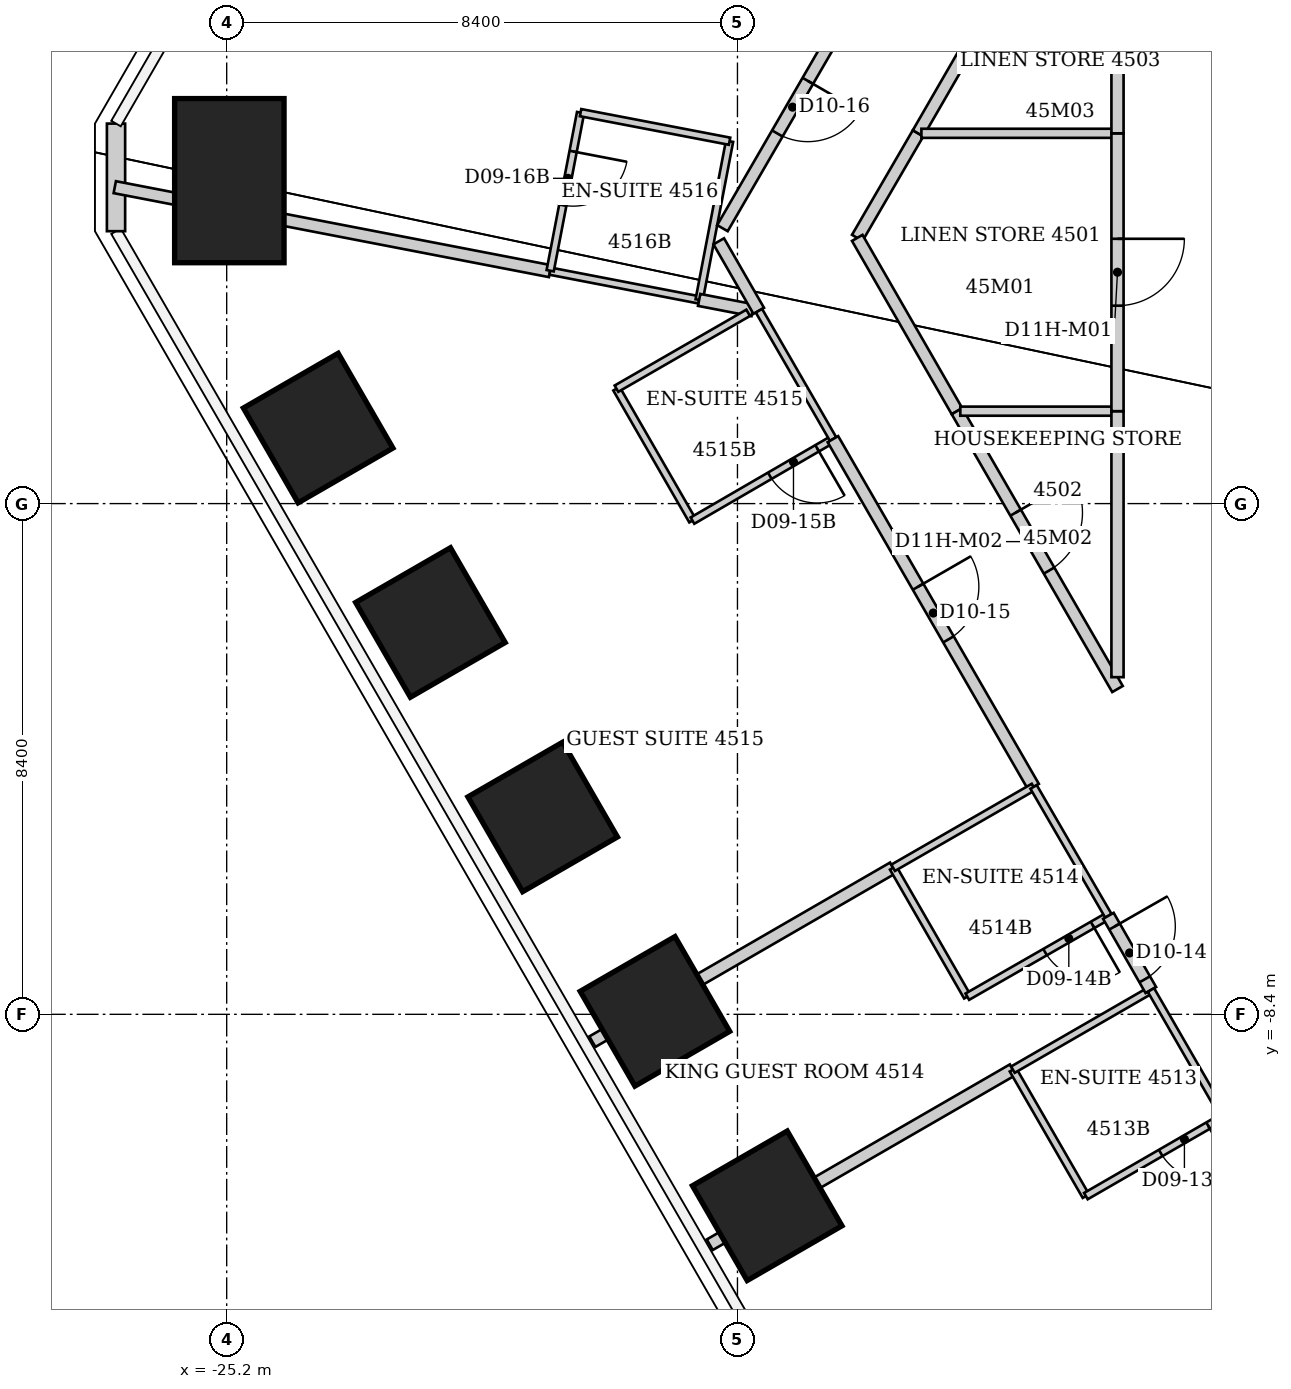
"""IFC4 building model, lengths in metres.
Left out: names, types, materials, properties, quantities, classifications, styles, units other than length and angle.
Written with IfcOpenShell. Run it as: python <this file> out.ifc"""

import sys

from ifc_helpers import new_model, si_unit, direction, frame, frame_2d, origin, origin_2d, place, context, subcontext, project, spatial, rectangle, extrude, element, fill, save


model = new_model("IFC4")
c1 = context("Model", 3, precision=1e-05, world=origin(), true_north=direction((0.0, 1.0)))
c2 = subcontext(c1, "Body", "Model", "MODEL_VIEW")
j1 = project(units=[si_unit("LENGTHUNIT", "METRE"), si_unit("PLANEANGLEUNIT", "RADIAN")], contexts=[c1])
p1 = place(None, origin())
s1 = spatial("IfcSite", under=j1, at=p1, CompositionType="ELEMENT")
p2 = place(p1, origin())
s2 = spatial("IfcBuilding", under=s1, at=p2, CompositionType="ELEMENT")
p3 = place(p2, frame((0.0, 0.0, 183.2)))
s3 = spatial("IfcBuildingStorey", under=s2, at=p3, CompositionType="ELEMENT", Elevation=183.2)
for number, where, z_axis, x_axis in (
    (1, (-16.311, -11.549, 0.0), (0.0, 0.0, 1.0), (-0.866, -0.5, 0.0)),
    (2, (-18.157, -8.351, 0.0), (0.0, 0.0, 1.0), (-0.866, -0.5, 0.0)),
    (3, (-20.003, -5.153, 0.0), (0.0, 0.0, 1.0), (-0.866, -0.5, 0.0)),
    (4, (-21.85, -1.956, 0.0), (0.0, 0.0, 1.0), (-0.866, -0.5, 0.0)),
    (5, (-23.696, 1.242, 0.0), (0.0, 0.0, 1.0), (-0.866, -0.5, 0.0)),
):
    element("IfcColumn", number, at=place(p3, frame(where, z_axis=z_axis, x_axis=x_axis)), inside=s3, PredefinedType="COLUMN", context=c2, shape_type="SweptSolid", body=[
        extrude(rectangle(XDim=1.8, YDim=1.8, at=origin_2d()), origin(), (0.0, 0.0, 1.0), 3.8),
    ])
p4 = place(p3, frame((-25.156, 5.311, 0.0), z_axis=(0.0, 0.0, 1.0), x_axis=(-1.0, 0.0, 0.0)))
e6 = element("IfcColumn", 6, at=p4, inside=s3, PredefinedType="COLUMN", context=c2, shape_type="SweptSolid", body=[
    extrude(rectangle(XDim=1.8, YDim=2.7, at=origin_2d()), origin(), (0.0, 0.0, 1.0), 3.8),
])
p5 = place(p3, frame((-27.02, 4.48, 0.0), z_axis=(0.0, 0.0, 1.0), x_axis=(0.0, 1.0, 0.0)))
e7 = element("IfcWall", 7, at=p5, inside=s3, PredefinedType="SOLIDWALL", context=c2, shape_type="SweptSolid", body=[
    extrude(rectangle(XDim=1.77, YDim=0.3, at=frame_2d((0.885, 0.0))), origin(), (0.0, 0.0, 1.0), 3.64),
])
p6 = place(p3, frame((-27.041, 5.204, 0.0), z_axis=(0.0, 0.0, 1.0), x_axis=(0.981883480928, -0.189485698355, 0.0)))
e8 = element("IfcWall", 8, at=p6, inside=s3, PredefinedType="PARTITIONING", context=c2, shape_type="SweptSolid", body=[
    extrude(rectangle(XDim=7.291, YDim=0.2, at=frame_2d((3.646, 0.0))), origin(), (0.0, 0.0, 1.0), 3.64),
])
p7 = place(p3, frame((-19.881, 3.823, 0.0), z_axis=(0.0, 0.0, 1.0), x_axis=(0.981896775229, -0.189416796496, 0.0)))
e9 = element("IfcWall", 9, at=p7, inside=s3, PredefinedType="PARTITIONING", context=c2, shape_type="SweptSolid", body=[
    extrude(rectangle(XDim=2.497, YDim=0.12, at=frame_2d((1.248, 0.0))), origin(), (0.0, 0.0, 1.0), 3.64),
])
p8 = place(p3, frame((-19.38, 6.43, 0.0), z_axis=(0.0, 0.0, 1.0), x_axis=(-0.18885765444, -0.982004473696, 0.0)))
e10 = element("IfcWall", 10, at=p8, inside=s3, PredefinedType="PARTITIONING", context=c2, shape_type="SweptSolid", body=[
    extrude(rectangle(XDim=2.647, YDim=0.12, at=frame_2d((1.324, 0.0))), origin(), (0.0, 0.0, 1.0), 3.64),
])
p9 = place(p8, frame((0.65, 0.0, 0.0)))
e11 = element("IfcOpeningElement", 11, at=p9, cuts=e10, PredefinedType="OPENING", context=c2, shape_type="SweptSolid", body=[
    extrude(rectangle(XDim=0.9, YDim=2.03, at=frame_2d((0.45, 1.015))), frame((0.0, 0.06, 0.0), z_axis=(0.0, -1.0, 0.0), x_axis=(1.0, 0.0, 0.0)), (0.0, 0.0, 1.0), 0.12),
])
p10 = place(p3, frame((-19.186, -8.85, 0.0), z_axis=(0.0, 0.0, 1.0), x_axis=(0.865702137343, 0.500559496364, 0.0)))
e12 = element("IfcWall", 12, at=p10, inside=s3, PredefinedType="PARTITIONING", context=c2, shape_type="SweptSolid", body=[
    extrude(rectangle(XDim=5.713, YDim=0.2, at=frame_2d((2.857, 0.0))), origin(), (0.0, 0.0, 1.0), 3.038),
])
p11 = place(p3, frame((-18.79, 1.89, 0.0), z_axis=(0.0, 0.0, 1.0), x_axis=(0.499159685399, -0.866510016372, 0.0)))
e13 = element("IfcWall", 13, at=p11, inside=s3, PredefinedType="PARTITIONING", context=c2, shape_type="SweptSolid", body=[
    extrude(rectangle(XDim=2.504, YDim=0.12, at=frame_2d((1.252, 0.0))), origin(), (0.0, 0.0, 1.0), 3.64),
])
p12 = place(p3, frame((-17.54, -0.28, 0.0), z_axis=(0.0, 0.0, 1.0), x_axis=(0.86498992408, 0.501789229896, 0.0)))
e14 = element("IfcWall", 14, at=p12, inside=s3, PredefinedType="PARTITIONING", context=c2, shape_type="SweptSolid", body=[
    extrude(rectangle(XDim=2.671, YDim=0.12, at=frame_2d((1.335, 0.0))), origin(), (0.0, 0.0, 1.0), 3.64),
])
p13 = place(p12, frame((1.47, 0.0, 0.0)))
e15 = element("IfcOpeningElement", 15, at=p13, cuts=e14, PredefinedType="OPENING", context=c2, shape_type="SweptSolid", body=[
    extrude(rectangle(XDim=0.9, YDim=2.03, at=frame_2d((0.45, 1.015))), frame((0.0, 0.06, 0.0), z_axis=(0.0, -1.0, 0.0), x_axis=(1.0, 0.0, 0.0)), (0.0, 0.0, 1.0), 0.12),
])
p14 = place(p3, frame((-17.43, 3.35, 0.0), z_axis=(0.0, 0.0, 1.0), x_axis=(0.188159009227, 0.982138578433, 0.0)))
e16 = element("IfcWall", 16, at=p14, inside=s3, PredefinedType="PARTITIONING", context=c2, shape_type="SweptSolid", body=[
    extrude(rectangle(XDim=2.657, YDim=0.12, at=frame_2d((1.329, 0.0))), origin(), (0.0, 0.0, 1.0), 3.64),
])
p15 = place(p3, frame((-17.43, 3.35, 0.0), z_axis=(0.0, 0.0, 1.0), x_axis=(0.981858463983, -0.189615286052, 0.0)))
e17 = element("IfcWall", 17, at=p15, inside=s3, PredefinedType="PARTITIONING", context=c2, shape_type="SweptSolid", body=[
    extrude(rectangle(XDim=0.896, YDim=0.2, at=frame_2d((0.448, 0.0))), origin(), (0.0, 0.0, 1.0), 3.64),
])
p16 = place(p3, frame((-17.256, -12.19, 0.0), z_axis=(0.0, 0.0, 1.0), x_axis=(0.865937714159, 0.500151852138, 0.0)))
e18 = element("IfcWall", 18, at=p16, inside=s3, PredefinedType="PARTITIONING", context=c2, shape_type="SweptSolid", body=[
    extrude(rectangle(XDim=5.758, YDim=0.2, at=frame_2d((2.879, 0.0))), origin(), (0.0, 0.0, 1.0), 3.038),
])
p17 = place(p3, frame((-17.108, 4.314, 0.0), z_axis=(0.0, 0.0, 1.0), x_axis=(0.498488506644, -0.866896307954, 0.0)))
e19 = element("IfcWall", 19, at=p17, inside=s3, PredefinedType="PARTITIONING", context=c2, shape_type="SweptSolid", body=[
    extrude(rectangle(XDim=1.319, YDim=0.2, at=frame_2d((0.66, 0.0))), origin(), (0.0, 0.0, 1.0), 3.64),
])
p18 = place(p3, frame((-16.93, 5.96, 0.0), z_axis=(0.0, 0.0, 1.0), x_axis=(-0.982097071605, 0.18837553436, 0.0)))
e20 = element("IfcWall", 20, at=p18, inside=s3, PredefinedType="PARTITIONING", context=c2, shape_type="SweptSolid", body=[
    extrude(rectangle(XDim=2.495, YDim=0.12, at=frame_2d((1.248, 0.0))), origin(), (0.0, 0.0, 1.0), 3.64),
])
p19 = place(p3, frame((-16.624, 3.138, 0.0), z_axis=(0.0, 0.0, 1.0), x_axis=(-0.866525185869, -0.499133351175, 0.0)))
e21 = element("IfcWall", 21, at=p19, inside=s3, PredefinedType="PARTITIONING", context=c2, shape_type="SweptSolid", body=[
    extrude(rectangle(XDim=2.5, YDim=0.12, at=frame_2d((1.25, 0.0))), origin(), (0.0, 0.0, 1.0), 3.038),
])
p20 = place(p3, frame((-16.447, 3.172, 0.0), z_axis=(0.0, 0.0, 1.0), x_axis=(0.500329330271, -0.865835181354, 0.0)))
e22 = element("IfcWall", 22, at=p20, inside=s3, PredefinedType="PARTITIONING", context=c2, shape_type="SweptSolid", body=[
    extrude(rectangle(XDim=2.437, YDim=0.12, at=frame_2d((1.219, 0.0))), origin(), (0.0, 0.0, 1.0), 3.64),
])
p21 = place(p3, frame((-15.23, 1.06, 0.0), z_axis=(0.0, 0.0, 1.0), x_axis=(0.499729921425, -0.866181277581, 0.0)))
e23 = element("IfcWall", 23, at=p21, inside=s3, PredefinedType="PARTITIONING", context=c2, shape_type="SweptSolid", body=[
    extrude(rectangle(XDim=6.604, YDim=0.2, at=frame_2d((3.302, 0.0))), origin(), (0.0, 0.0, 1.0), 3.64),
])
p22 = place(p21, frame((2.802, 0.0, 0.0)))
e24 = element("IfcOpeningElement", 24, at=p22, cuts=e23, PredefinedType="OPENING", context=c2, shape_type="SweptSolid", body=[
    extrude(rectangle(XDim=1.0, YDim=2.13, at=frame_2d((0.5, 1.065))), frame((0.0, 0.1, 0.0), z_axis=(0.0, -1.0, 0.0), x_axis=(1.0, 0.0, 0.0)), (0.0, 0.0, 1.0), 0.2),
])
p23 = place(p3, frame((-14.83, 4.37, 0.0), z_axis=(0.0, 0.0, 1.0), x_axis=(0.502626855825, 0.864503466623, 0.0)))
e25 = element("IfcWall", 25, at=p23, inside=s3, PredefinedType="PARTITIONING", context=c2, shape_type="SweptSolid", body=[
    extrude(rectangle(XDim=1.99, YDim=0.2, at=frame_2d((0.995, 0.0))), origin(), (0.0, 0.0, 1.0), 3.64),
])
p24 = place(p3, frame((-14.74, 8.51, 0.0), z_axis=(0.0, 0.0, 1.0), x_axis=(-0.501513165407, -0.865150012959, 0.0)))
e26 = element("IfcWall", 26, at=p24, inside=s3, PredefinedType="PARTITIONING", context=c2, shape_type="SweptSolid", body=[
    extrude(rectangle(XDim=4.6, YDim=0.2, at=frame_2d((2.3, 0.0))), origin(), (0.0, 0.0, 1.0), 3.64),
])
p25 = place(p24, frame((1.8, 0.0, 0.0)))
e27 = element("IfcOpeningElement", 27, at=p25, cuts=e26, PredefinedType="OPENING", context=c2, shape_type="SweptSolid", body=[
    extrude(rectangle(XDim=1.0, YDim=2.13, at=frame_2d((0.5, 1.065))), frame((0.0, 0.1, 0.0), z_axis=(0.0, -1.0, 0.0), x_axis=(1.0, 0.0, 0.0)), (0.0, 0.0, 1.0), 0.2),
])
p26 = place(p3, frame((-14.24, -5.99, 0.0), z_axis=(0.0, 0.0, 1.0), x_axis=(0.498748634132, -0.866746675766, 0.0)))
e28 = element("IfcWall", 28, at=p26, inside=s3, PredefinedType="PARTITIONING", context=c2, shape_type="SweptSolid", body=[
    extrude(rectangle(XDim=2.446, YDim=0.12, at=frame_2d((1.223, 0.0))), origin(), (0.0, 0.0, 1.0), 3.64),
])
p27 = place(p3, frame((-14.24, -5.99, 0.0), z_axis=(0.0, 0.0, 1.0), x_axis=(0.866615255992, 0.498976951453, 0.0)))
e29 = element("IfcWall", 29, at=p27, inside=s3, PredefinedType="PARTITIONING", context=c2, shape_type="SweptSolid", body=[
    extrude(rectangle(XDim=2.666, YDim=0.12, at=frame_2d((1.333, 0.0))), origin(), (0.0, 0.0, 1.0), 3.038),
])
p28 = place(p3, frame((-13.83, 6.09, 0.0), z_axis=(0.0, 0.0, 1.0), x_axis=(0.500248310865, 0.865881993967, 0.0)))
e30 = element("IfcWall", 30, at=p28, inside=s3, PredefinedType="PARTITIONING", context=c2, shape_type="SweptSolid", body=[
    extrude(rectangle(XDim=5.278, YDim=0.2, at=frame_2d((2.639, 0.0))), origin(), (0.0, 0.0, 1.0), 3.64),
])
p29 = place(p3, frame((-13.775, 6.09, 0.0), z_axis=(0.0, 0.0, 1.0), x_axis=(1.0, 0.0, 0.0)))
e31 = element("IfcWall", 31, at=p29, inside=s3, PredefinedType="PARTITIONING", context=c2, shape_type="SweptSolid", body=[
    extrude(rectangle(XDim=3.225, YDim=0.15, at=frame_2d((1.612, 0.0))), origin(), (0.0, 0.0, 1.0), 3.64),
])
p30 = place(p3, frame((-13.19, 1.52, 0.0), z_axis=(0.0, 0.0, 1.0), x_axis=(-0.498775186059, 0.866731396554, 0.0)))
e32 = element("IfcWall", 32, at=p30, inside=s3, PredefinedType="PARTITIONING", context=c2, shape_type="SweptSolid", body=[
    extrude(rectangle(XDim=3.288, YDim=0.2, at=frame_2d((1.644, 0.0))), origin(), (0.0, 0.0, 1.0), 3.64),
])
p31 = place(p3, frame((-13.02, -8.11, 0.0), z_axis=(0.0, 0.0, 1.0), x_axis=(0.867545659855, 0.497357545501, 0.0)))
e33 = element("IfcWall", 33, at=p31, inside=s3, PredefinedType="PARTITIONING", context=c2, shape_type="SweptSolid", body=[
    extrude(rectangle(XDim=2.674, YDim=0.12, at=frame_2d((1.337, 0.0))), origin(), (0.0, 0.0, 1.0), 3.64),
])
p32 = place(p31, frame((1.474, 0.0, 0.0)))
e34 = element("IfcOpeningElement", 34, at=p32, cuts=e33, PredefinedType="OPENING", context=c2, shape_type="SweptSolid", body=[
    extrude(rectangle(XDim=0.9, YDim=2.03, at=frame_2d((0.45, 1.015))), frame((0.0, 0.06, 0.0), z_axis=(0.0, -1.0, 0.0), x_axis=(1.0, 0.0, 0.0)), (0.0, 0.0, 1.0), 0.12),
])
p33 = place(p3, frame((-12.27, -9.31, 0.0), z_axis=(0.0, 0.0, 1.0), x_axis=(0.499737123639, -0.866177122335, 0.0)))
e35 = element("IfcWall", 35, at=p33, inside=s3, PredefinedType="PARTITIONING", context=c2, shape_type="SweptSolid", body=[
    extrude(rectangle(XDim=2.401, YDim=0.12, at=frame_2d((1.201, 0.0))), origin(), (0.0, 0.0, 1.0), 3.64),
])
p34 = place(p3, frame((-12.27, -9.31, 0.0), z_axis=(0.0, 0.0, 1.0), x_axis=(0.866114241029, 0.499846097802, 0.0)))
e36 = element("IfcWall", 36, at=p34, inside=s3, PredefinedType="PARTITIONING", context=c2, shape_type="SweptSolid", body=[
    extrude(rectangle(XDim=2.621, YDim=0.12, at=frame_2d((1.311, 0.0))), origin(), (0.0, 0.0, 1.0), 3.038),
])
p35 = place(p3, frame((-11.93, -4.66, 0.0), z_axis=(0.0, 0.0, 1.0), x_axis=(0.501813488763, -0.864975850817, 0.0)))
e37 = element("IfcWall", 37, at=p35, inside=s3, PredefinedType="PARTITIONING", context=c2, shape_type="SweptSolid", body=[
    extrude(rectangle(XDim=2.451, YDim=0.12, at=frame_2d((1.226, 0.0))), origin(), (0.0, 0.0, 1.0), 3.64),
])
p36 = place(p3, frame((-11.07, -11.39, 0.0), z_axis=(0.0, 0.0, 1.0), x_axis=(0.866154567199, 0.49977621564, 0.0)))
e38 = element("IfcWall", 38, at=p36, inside=s3, PredefinedType="PARTITIONING", context=c2, shape_type="SweptSolid", body=[
    extrude(rectangle(XDim=2.621, YDim=0.12, at=frame_2d((1.311, 0.0))), origin(), (0.0, 0.0, 1.0), 3.64),
])
p37 = place(p36, frame((1.421, 0.0, 0.0)))
e39 = element("IfcOpeningElement", 39, at=p37, cuts=e38, PredefinedType="OPENING", context=c2, shape_type="SweptSolid", body=[
    extrude(rectangle(XDim=0.9, YDim=2.03, at=frame_2d((0.45, 1.015))), frame((0.0, 0.06, 0.0), z_axis=(0.0, -1.0, 0.0), x_axis=(1.0, 0.0, 0.0)), (0.0, 0.0, 1.0), 0.12),
])
p38 = place(p3, frame((-10.7, -6.78, 0.0), z_axis=(0.0, 0.0, 1.0), x_axis=(0.49643800013, -0.868072181346, 0.0)))
e40 = element("IfcWall", 40, at=p38, inside=s3, PredefinedType="PARTITIONING", context=c2, shape_type="SweptSolid", body=[
    extrude(rectangle(XDim=1.406, YDim=0.2, at=frame_2d((0.703, 0.0))), origin(), (0.0, 0.0, 1.0), 3.64),
])
p39 = place(p38, frame((0.203, 0.0, 0.0)))
e41 = element("IfcOpeningElement", 41, at=p39, cuts=e40, PredefinedType="OPENING", context=c2, shape_type="SweptSolid", body=[
    extrude(rectangle(XDim=1.0, YDim=2.13, at=frame_2d((0.5, 1.065))), frame((0.0, 0.1, 0.0), z_axis=(0.0, -1.0, 0.0), x_axis=(1.0, 0.0, 0.0)), (0.0, 0.0, 1.0), 0.2),
])
p40 = place(p3, frame((-10.55, -3.05, 0.0), z_axis=(0.0, 0.0, 1.0), x_axis=(-0.500193590286, 0.865913605527, 0.0)))
e42 = element("IfcWall", 42, at=p40, inside=s3, PredefinedType="PARTITIONING", context=c2, shape_type="SweptSolid", body=[
    extrude(rectangle(XDim=5.278, YDim=0.2, at=frame_2d((2.639, 0.0))), origin(), (0.0, 0.0, 1.0), 3.64),
])
p41 = place(p40, frame((2.25, 0.0, 0.0)))
e43 = element("IfcOpeningElement", 43, at=p41, cuts=e42, PredefinedType="OPENING", context=c2, shape_type="SweptSolid", body=[
    extrude(rectangle(XDim=1.1, YDim=2.2, at=frame_2d((0.55, 1.1))), frame((0.0, 0.1, 0.0), z_axis=(0.0, -1.0, 0.0), x_axis=(1.0, 0.0, 0.0)), (0.0, 0.0, 1.0), 0.2),
])
p42 = place(p3, frame((-10.55, 1.52, 0.0), z_axis=(0.0, 0.0, 1.0), x_axis=(-1.0, 0.0, 0.0)))
e44 = element("IfcWall", 44, at=p42, inside=s3, PredefinedType="PARTITIONING", context=c2, shape_type="SweptSolid", body=[
    extrude(rectangle(XDim=2.585, YDim=0.15, at=frame_2d((1.292, 0.0))), origin(), (0.0, 0.0, 1.0), 3.64),
])
p43 = place(p3, frame((-10.55, 1.52, 0.0), z_axis=(0.0, 0.0, 1.0), x_axis=(0.0, -1.0, 0.0)))
e45 = element("IfcWall", 45, at=p43, inside=s3, PredefinedType="PARTITIONING", context=c2, shape_type="SweptSolid", body=[
    extrude(rectangle(XDim=4.375, YDim=0.2, at=frame_2d((2.188, 0.0))), origin(), (0.0, 0.0, 1.0), 3.64),
])
p44 = place(p3, frame((-10.55, 6.09, 0.0), z_axis=(0.0, 0.0, 1.0), x_axis=(0.0, -1.0, 0.0)))
e46 = element("IfcWall", 46, at=p44, inside=s3, PredefinedType="PARTITIONING", context=c2, shape_type="SweptSolid", body=[
    extrude(rectangle(XDim=4.57, YDim=0.2, at=frame_2d((2.285, 0.0))), origin(), (0.0, 0.0, 1.0), 3.64),
])
p45 = place(p44, frame((1.735, 0.0, 0.0)))
e47 = element("IfcOpeningElement", 47, at=p45, cuts=e46, PredefinedType="OPENING", context=c2, shape_type="SweptSolid", body=[
    extrude(rectangle(XDim=1.1, YDim=2.2, at=frame_2d((0.55, 1.1))), frame((0.0, 0.1, 0.0), z_axis=(0.0, -1.0, 0.0), x_axis=(1.0, 0.0, 0.0)), (0.0, 0.0, 1.0), 0.2),
])
p46 = place(p3, frame((-10.55, 8.89, 0.0), z_axis=(0.0, 0.0, 1.0), x_axis=(0.0, -1.0, 0.0)))
e48 = element("IfcWall", 48, at=p46, inside=s3, PredefinedType="PARTITIONING", context=c2, shape_type="SweptSolid", body=[
    extrude(rectangle(XDim=2.8, YDim=0.2, at=frame_2d((1.4, 0.0))), origin(), (0.0, 0.0, 1.0), 3.64),
])
p47 = place(p3, frame((-10.0, -8.0, 0.0), z_axis=(0.0, 0.0, 1.0), x_axis=(0.499693115345, -0.866202511239, 0.0)))
e49 = element("IfcWall", 49, at=p47, inside=s3, PredefinedType="PARTITIONING", context=c2, shape_type="SweptSolid", body=[
    extrude(rectangle(XDim=2.401, YDim=0.12, at=frame_2d((1.201, 0.0))), origin(), (0.0, 0.0, 1.0), 3.64),
])
p48 = place(p37, origin())
e50 = element("IfcDoor", 50, at=p48, inside=s3, OperationType="SINGLE_SWING_RIGHT", PredefinedType="DOOR", context=c2, shape_type="SweptSolid", body=[
    extrude(rectangle(XDim=0.9, YDim=2.03, at=frame_2d((0.45, 1.015))), frame((0.0, 0.025, 0.0), z_axis=(0.0, -1.0, 0.0), x_axis=(1.0, 0.0, 0.0)), (0.0, 0.0, 1.0), 0.05),
])
fill(e39, e50)
p49 = place(p39, origin())
e51 = element("IfcDoor", 51, at=p49, inside=s3, OperationType="SINGLE_SWING_LEFT", PredefinedType="DOOR", context=c2, shape_type="SweptSolid", body=[
    extrude(rectangle(XDim=1.0, YDim=2.13, at=frame_2d((0.5, 1.065))), frame((0.0, 0.025, 0.0), z_axis=(0.0, -1.0, 0.0), x_axis=(1.0, 0.0, 0.0)), (0.0, 0.0, 1.0), 0.05),
])
fill(e41, e51)
p50 = place(p32, origin())
e52 = element("IfcDoor", 52, at=p50, inside=s3, OperationType="SINGLE_SWING_RIGHT", PredefinedType="DOOR", context=c2, shape_type="SweptSolid", body=[
    extrude(rectangle(XDim=0.9, YDim=2.03, at=frame_2d((0.45, 1.015))), frame((0.0, 0.025, 0.0), z_axis=(0.0, -1.0, 0.0), x_axis=(1.0, 0.0, 0.0)), (0.0, 0.0, 1.0), 0.05),
])
fill(e34, e52)
p51 = place(p22, origin())
e53 = element("IfcDoor", 53, at=p51, inside=s3, OperationType="SINGLE_SWING_LEFT", PredefinedType="DOOR", context=c2, shape_type="SweptSolid", body=[
    extrude(rectangle(XDim=1.0, YDim=2.13, at=frame_2d((0.5, 1.065))), frame((0.0, 0.025, 0.0), z_axis=(0.0, -1.0, 0.0), x_axis=(1.0, 0.0, 0.0)), (0.0, 0.0, 1.0), 0.05),
])
fill(e24, e53)
p52 = place(p13, origin())
e54 = element("IfcDoor", 54, at=p52, inside=s3, OperationType="SINGLE_SWING_RIGHT", PredefinedType="DOOR", context=c2, shape_type="SweptSolid", body=[
    extrude(rectangle(XDim=0.9, YDim=2.03, at=frame_2d((0.45, 1.015))), frame((0.0, 0.025, 0.0), z_axis=(0.0, -1.0, 0.0), x_axis=(1.0, 0.0, 0.0)), (0.0, 0.0, 1.0), 0.05),
])
fill(e15, e54)
p53 = place(p25, origin())
e55 = element("IfcDoor", 55, at=p53, inside=s3, OperationType="SINGLE_SWING_LEFT", PredefinedType="DOOR", context=c2, shape_type="SweptSolid", body=[
    extrude(rectangle(XDim=1.0, YDim=2.13, at=frame_2d((0.5, 1.065))), frame((0.0, 0.025, 0.0), z_axis=(0.0, -1.0, 0.0), x_axis=(1.0, 0.0, 0.0)), (0.0, 0.0, 1.0), 0.05),
])
fill(e27, e55)
p54 = place(p9, origin())
e56 = element("IfcDoor", 56, at=p54, inside=s3, OperationType="SINGLE_SWING_LEFT", PredefinedType="DOOR", context=c2, shape_type="SweptSolid", body=[
    extrude(rectangle(XDim=0.9, YDim=2.03, at=frame_2d((0.45, 1.015))), frame((0.0, 0.025, 0.0), z_axis=(0.0, -1.0, 0.0), x_axis=(1.0, 0.0, 0.0)), (0.0, 0.0, 1.0), 0.05),
])
fill(e11, e56)
p55 = place(p45, origin())
e57 = element("IfcDoor", 57, at=p55, inside=s3, OperationType="SINGLE_SWING_LEFT", PredefinedType="DOOR", context=c2, shape_type="SweptSolid", body=[
    extrude(rectangle(XDim=1.1, YDim=2.2, at=frame_2d((0.55, 1.1))), frame((0.0, 0.025, 0.0), z_axis=(0.0, -1.0, 0.0), x_axis=(1.0, 0.0, 0.0)), (0.0, 0.0, 1.0), 0.05),
])
fill(e47, e57)
p56 = place(p41, origin())
e58 = element("IfcDoor", 58, at=p56, inside=s3, OperationType="SINGLE_SWING_RIGHT", PredefinedType="DOOR", context=c2, shape_type="SweptSolid", body=[
    extrude(rectangle(XDim=1.1, YDim=2.2, at=frame_2d((0.55, 1.1))), frame((0.0, 0.025, 0.0), z_axis=(0.0, -1.0, 0.0), x_axis=(1.0, 0.0, 0.0)), (0.0, 0.0, 1.0), 0.05),
])
fill(e43, e58)
save(model, sys.argv[1])
